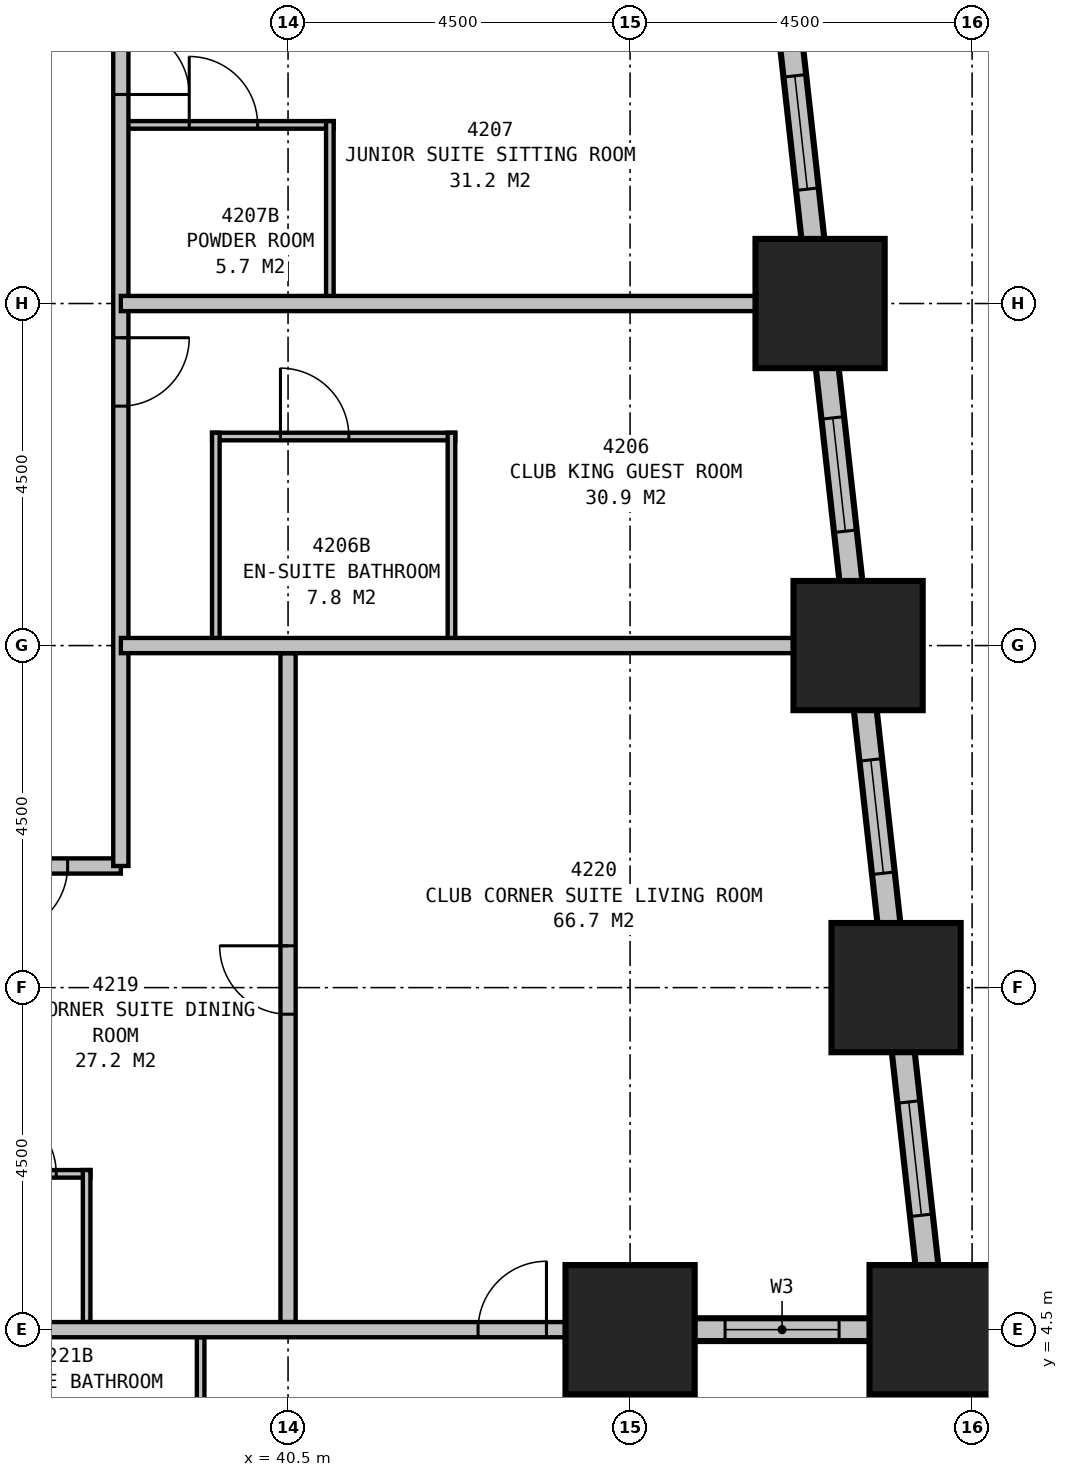
"""IFC4 building model, lengths in metres.
Left out: names, types, materials, properties, quantities, classifications, styles, units other than length and angle.
Written with IfcOpenShell. Run it as: python <this file> out.ifc"""

import sys

from ifc_helpers import new_model, si_unit, direction, frame, frame_2d, origin, origin_2d, place, context, subcontext, project, spatial, rectangle, extrude, element, fill, save


model = new_model("IFC4")
c1 = context("Model", 3, precision=1e-05, world=origin(), true_north=direction((0.0, 1.0)))
c2 = subcontext(c1, "Body", "Model", "MODEL_VIEW")
j1 = project(units=[si_unit("LENGTHUNIT", "METRE"), si_unit("PLANEANGLEUNIT", "RADIAN")], contexts=[c1])
p1 = place(None, origin())
s1 = spatial("IfcSite", under=j1, at=p1, CompositionType="ELEMENT")
p2 = place(p1, origin())
s2 = spatial("IfcBuilding", under=s1, at=p2, CompositionType="ELEMENT")
p3 = place(p2, frame((0.0, 0.0, 165.9)))
s3 = spatial("IfcBuildingStorey", under=s2, at=p3, CompositionType="ELEMENT", Elevation=165.9)
for number, where, z_axis, x_axis in (
    (1, (45.0, 4.5, 0.0), (0.0, 0.0, 1.0), (1.0, 0.0, 0.0)),
    (2, (49.0, 4.5, 0.0), (0.0, 0.0, 1.0), (1.0, 0.0, 0.0)),
    (3, (48.5, 9.0, 0.0), (0.0, 0.0, 1.0), (1.0, 0.0, 0.0)),
    (4, (48.0, 13.5, 0.0), (0.0, 0.0, 1.0), (1.0, 0.0, 0.0)),
    (5, (47.5, 18.0, 0.0), (0.0, 0.0, 1.0), (1.0, 0.0, 0.0)),
):
    element("IfcColumn", number, at=place(p3, frame(where, z_axis=z_axis, x_axis=x_axis)), inside=s3, PredefinedType="COLUMN", context=c2, shape_type="SweptSolid", body=[
        extrude(rectangle(XDim=1.7, YDim=1.7, at=origin_2d()), origin(), (0.0, 0.0, 1.0), 3.5),
    ])
p4 = place(p3, frame((45.0, -0.15, 0.0), z_axis=(0.0, 0.0, 1.0), x_axis=(0.0, 1.0, 0.0)))
e6 = element("IfcWall", 6, at=p4, inside=s3, PredefinedType="STANDARD", context=c2, shape_type="SweptSolid", body=[
    extrude(rectangle(XDim=4.8, YDim=0.3, at=frame_2d((2.4, 0.0))), origin(), (0.0, 0.0, 1.0), 2.25),
])
p5 = place(p4, frame((1.2, 0.0, 0.5)))
e7 = element("IfcOpeningElement", 7, at=p5, cuts=e6, PredefinedType="OPENING", context=c2, shape_type="SweptSolid", body=[
    extrude(rectangle(XDim=2.4, YDim=1.6, at=frame_2d((1.2, 0.8))), frame((0.0, 0.16, 0.0), z_axis=(0.0, -1.0, 0.0), x_axis=(1.0, 0.0, 0.0)), (0.0, 0.0, 1.0), 0.32),
])
p6 = place(p3, frame((44.85, 4.5, 0.0), z_axis=(0.0, 0.0, 1.0), x_axis=(1.0, 0.0, 0.0)))
e8 = element("IfcWall", 8, at=p6, inside=s3, PredefinedType="STANDARD", context=c2, shape_type="SweptSolid", body=[
    extrude(rectangle(XDim=4.3, YDim=0.3, at=frame_2d((2.15, 0.0))), origin(), (0.0, 0.0, 1.0), 2.25),
])
p7 = place(p6, frame((1.4, 0.0, 0.5)))
e9 = element("IfcOpeningElement", 9, at=p7, cuts=e8, PredefinedType="OPENING", context=c2, shape_type="SweptSolid", body=[
    extrude(rectangle(XDim=1.5, YDim=1.6, at=frame_2d((0.75, 0.8))), frame((0.0, 0.16, 0.0), z_axis=(0.0, -1.0, 0.0), x_axis=(1.0, 0.0, 0.0)), (0.0, 0.0, 1.0), 0.32),
])
p8 = place(p3, frame((49.017, 4.351, 0.0), z_axis=(0.0, 0.0, 1.0), x_axis=(-0.110433201132, 0.993883548555, 0.0)))
e10 = element("IfcWall", 10, at=p8, inside=s3, PredefinedType="STANDARD", context=c2, shape_type="SweptSolid", body=[
    extrude(rectangle(XDim=31.994, YDim=0.3, at=frame_2d((15.997, 0.0))), origin(), (0.0, 0.0, 1.0), 2.25),
])
p9 = place(p8, frame((1.664, 0.0, 0.5)))
e11 = element("IfcOpeningElement", 11, at=p9, cuts=e10, PredefinedType="OPENING", context=c2, shape_type="SweptSolid", body=[
    extrude(rectangle(XDim=1.5, YDim=1.6, at=frame_2d((0.75, 0.8))), frame((0.0, 0.16, 0.0), z_axis=(0.0, -1.0, 0.0), x_axis=(1.0, 0.0, 0.0)), (0.0, 0.0, 1.0), 0.32),
])
p10 = place(p8, frame((6.192, 0.0, 0.5)))
e12 = element("IfcOpeningElement", 12, at=p10, cuts=e10, PredefinedType="OPENING", context=c2, shape_type="SweptSolid", body=[
    extrude(rectangle(XDim=1.5, YDim=1.6, at=frame_2d((0.75, 0.8))), frame((0.0, 0.16, 0.0), z_axis=(0.0, -1.0, 0.0), x_axis=(1.0, 0.0, 0.0)), (0.0, 0.0, 1.0), 0.32),
])
p11 = place(p8, frame((10.719, 0.0, 0.5)))
e13 = element("IfcOpeningElement", 13, at=p11, cuts=e10, PredefinedType="OPENING", context=c2, shape_type="SweptSolid", body=[
    extrude(rectangle(XDim=1.5, YDim=1.6, at=frame_2d((0.75, 0.8))), frame((0.0, 0.16, 0.0), z_axis=(0.0, -1.0, 0.0), x_axis=(1.0, 0.0, 0.0)), (0.0, 0.0, 1.0), 0.32),
])
p12 = place(p8, frame((15.247, 0.0, 0.5)))
e14 = element("IfcOpeningElement", 14, at=p12, cuts=e10, PredefinedType="OPENING", context=c2, shape_type="SweptSolid", body=[
    extrude(rectangle(XDim=1.5, YDim=1.6, at=frame_2d((0.75, 0.8))), frame((0.0, 0.16, 0.0), z_axis=(0.0, -1.0, 0.0), x_axis=(1.0, 0.0, 0.0)), (0.0, 0.0, 1.0), 0.32),
])
p13 = place(p8, frame((19.775, 0.0, 0.5)))
e15 = element("IfcOpeningElement", 15, at=p13, cuts=e10, PredefinedType="OPENING", context=c2, shape_type="SweptSolid", body=[
    extrude(rectangle(XDim=1.5, YDim=1.6, at=frame_2d((0.75, 0.8))), frame((0.0, 0.16, 0.0), z_axis=(0.0, -1.0, 0.0), x_axis=(1.0, 0.0, 0.0)), (0.0, 0.0, 1.0), 0.32),
])
p14 = place(p8, frame((24.302, 0.0, 0.5)))
e16 = element("IfcOpeningElement", 16, at=p14, cuts=e10, PredefinedType="OPENING", context=c2, shape_type="SweptSolid", body=[
    extrude(rectangle(XDim=1.5, YDim=1.6, at=frame_2d((0.75, 0.8))), frame((0.0, 0.16, 0.0), z_axis=(0.0, -1.0, 0.0), x_axis=(1.0, 0.0, 0.0)), (0.0, 0.0, 1.0), 0.32),
])
p15 = place(p8, frame((28.83, 0.0, 0.5)))
e17 = element("IfcOpeningElement", 17, at=p15, cuts=e10, PredefinedType="OPENING", context=c2, shape_type="SweptSolid", body=[
    extrude(rectangle(XDim=1.5, YDim=1.6, at=frame_2d((0.75, 0.8))), frame((0.0, 0.16, 0.0), z_axis=(0.0, -1.0, 0.0), x_axis=(1.0, 0.0, 0.0)), (0.0, 0.0, 1.0), 0.32),
])
p16 = place(p3, frame((11.2, 10.6, 0.0), z_axis=(0.0, 0.0, 1.0), x_axis=(1.0, 0.0, 0.0)))
e18 = element("IfcWall", 18, at=p16, inside=s3, PredefinedType="PARTITIONING", context=c2, shape_type="SweptSolid", body=[
    extrude(rectangle(XDim=27.1, YDim=0.2, at=frame_2d((13.55, 0.0))), origin(), (0.0, 0.0, 1.0), 3.25),
])
p17 = place(p16, frame((4.05, 0.0, 0.0), z_axis=(0.0, 0.0, 1.0), x_axis=(-1.0, 0.0, 0.0)))
e19 = element("IfcOpeningElement", 19, at=p17, cuts=e18, PredefinedType="OPENING", context=c2, shape_type="SweptSolid", body=[
    extrude(rectangle(XDim=0.9, YDim=2.1, at=frame_2d((0.45, 1.05))), frame((0.0, 0.11, 0.0), z_axis=(0.0, -1.0, 0.0), x_axis=(1.0, 0.0, 0.0)), (0.0, 0.0, 1.0), 0.22),
])
p18 = place(p16, frame((12.65, 0.0, 0.0), z_axis=(0.0, 0.0, 1.0), x_axis=(-1.0, 0.0, 0.0)))
e20 = element("IfcOpeningElement", 20, at=p18, cuts=e18, PredefinedType="OPENING", context=c2, shape_type="SweptSolid", body=[
    extrude(rectangle(XDim=1.0, YDim=2.1, at=frame_2d((0.5, 1.05))), frame((0.0, 0.11, 0.0), z_axis=(0.0, -1.0, 0.0), x_axis=(1.0, 0.0, 0.0)), (0.0, 0.0, 1.0), 0.22),
])
p19 = place(p16, frame((17.55, 0.0, 0.0), z_axis=(0.0, 0.0, 1.0), x_axis=(-1.0, 0.0, 0.0)))
e21 = element("IfcOpeningElement", 21, at=p19, cuts=e18, PredefinedType="OPENING", context=c2, shape_type="SweptSolid", body=[
    extrude(rectangle(XDim=0.9, YDim=2.1, at=frame_2d((0.45, 1.05))), frame((0.0, 0.11, 0.0), z_axis=(0.0, -1.0, 0.0), x_axis=(1.0, 0.0, 0.0)), (0.0, 0.0, 1.0), 0.22),
])
p20 = place(p16, frame((1.6, 0.0, 0.0), z_axis=(0.0, 0.0, 1.0), x_axis=(-1.0, 0.0, 0.0)))
e22 = element("IfcOpeningElement", 22, at=p20, cuts=e18, PredefinedType="OPENING", context=c2, shape_type="SweptSolid", body=[
    extrude(rectangle(XDim=0.9, YDim=2.1, at=frame_2d((0.45, 1.05))), frame((0.0, 0.11, 0.0), z_axis=(0.0, -1.0, 0.0), x_axis=(1.0, 0.0, 0.0)), (0.0, 0.0, 1.0), 0.22),
])
p21 = place(p16, frame((26.4, 0.0, 0.0), z_axis=(0.0, 0.0, 1.0), x_axis=(-1.0, 0.0, 0.0)))
e23 = element("IfcOpeningElement", 23, at=p21, cuts=e18, PredefinedType="OPENING", context=c2, shape_type="SweptSolid", body=[
    extrude(rectangle(XDim=0.9, YDim=2.1, at=frame_2d((0.45, 1.05))), frame((0.0, 0.11, 0.0), z_axis=(0.0, -1.0, 0.0), x_axis=(1.0, 0.0, 0.0)), (0.0, 0.0, 1.0), 0.22),
])
p22 = place(p3, frame((38.3, 10.6, 0.0), z_axis=(0.0, 0.0, 1.0), x_axis=(0.0, 1.0, 0.0)))
e24 = element("IfcWall", 24, at=p22, inside=s3, PredefinedType="PARTITIONING", context=c2, shape_type="SweptSolid", body=[
    extrude(rectangle(XDim=18.7, YDim=0.2, at=frame_2d((9.35, 0.0))), origin(), (0.0, 0.0, 1.0), 3.25),
])
p23 = place(p22, frame((6.95, 0.0, 0.0), z_axis=(0.0, 0.0, 1.0), x_axis=(-1.0, 0.0, 0.0)))
e25 = element("IfcOpeningElement", 25, at=p23, cuts=e24, PredefinedType="OPENING", context=c2, shape_type="SweptSolid", body=[
    extrude(rectangle(XDim=0.9, YDim=2.1, at=frame_2d((0.45, 1.05))), frame((0.0, 0.11, 0.0), z_axis=(0.0, -1.0, 0.0), x_axis=(1.0, 0.0, 0.0)), (0.0, 0.0, 1.0), 0.22),
])
p24 = place(p22, frame((11.05, 0.0, 0.0), z_axis=(0.0, 0.0, 1.0), x_axis=(-1.0, 0.0, 0.0)))
e26 = element("IfcOpeningElement", 26, at=p24, cuts=e24, PredefinedType="OPENING", context=c2, shape_type="SweptSolid", body=[
    extrude(rectangle(XDim=0.9, YDim=2.1, at=frame_2d((0.45, 1.05))), frame((0.0, 0.11, 0.0), z_axis=(0.0, -1.0, 0.0), x_axis=(1.0, 0.0, 0.0)), (0.0, 0.0, 1.0), 0.22),
])
p25 = place(p3, frame((38.3, 18.0, 0.0), z_axis=(0.0, 0.0, 1.0), x_axis=(1.0, 0.0, 0.0)))
e27 = element("IfcWall", 27, at=p25, inside=s3, PredefinedType="PARTITIONING", context=c2, shape_type="SweptSolid", body=[
    extrude(rectangle(XDim=9.199, YDim=0.2, at=frame_2d((4.6, 0.0))), origin(), (0.0, 0.0, 1.0), 2.25),
])
for number, where, z_axis, x_axis in (
    (28, (39.55, 13.5, 0.0), (0.0, 0.0, 1.0), (0.0, 1.0, 0.0)),
    (29, (42.65, 13.5, 0.0), (0.0, 0.0, 1.0), (0.0, 1.0, 0.0)),
):
    element("IfcWall", number, at=place(p3, frame(where, z_axis=z_axis, x_axis=x_axis)), inside=s3, PredefinedType="PLUMBINGWALL", context=c2, shape_type="SweptSolid", body=[
        extrude(rectangle(XDim=2.8, YDim=0.1, at=frame_2d((1.4, 0.0))), origin(), (0.0, 0.0, 1.0), 3.25),
    ])
p26 = place(p3, frame((39.5, 16.25, 0.0), z_axis=(0.0, 0.0, 1.0), x_axis=(1.0, 0.0, 0.0)))
e30 = element("IfcWall", 30, at=p26, inside=s3, PredefinedType="PLUMBINGWALL", context=c2, shape_type="SweptSolid", body=[
    extrude(rectangle(XDim=3.2, YDim=0.1, at=frame_2d((1.6, 0.0))), origin(), (0.0, 0.0, 1.0), 3.25),
])
p27 = place(p26, frame((0.9, 0.0, 0.0)))
e31 = element("IfcOpeningElement", 31, at=p27, cuts=e30, PredefinedType="OPENING", context=c2, shape_type="SweptSolid", body=[
    extrude(rectangle(XDim=0.9, YDim=2.1, at=frame_2d((0.45, 1.05))), frame((0.0, 0.06, 0.0), z_axis=(0.0, -1.0, 0.0), x_axis=(1.0, 0.0, 0.0)), (0.0, 0.0, 1.0), 0.12),
])
p28 = place(p3, frame((41.05, 18.0, 0.0), z_axis=(0.0, 0.0, 1.0), x_axis=(0.0, 1.0, 0.0)))
e32 = element("IfcWall", 32, at=p28, inside=s3, PredefinedType="PLUMBINGWALL", context=c2, shape_type="SweptSolid", body=[
    extrude(rectangle(XDim=2.4, YDim=0.1, at=frame_2d((1.2, 0.0))), origin(), (0.0, 0.0, 1.0), 3.25),
])
p29 = place(p3, frame((38.3, 20.35, 0.0), z_axis=(0.0, 0.0, 1.0), x_axis=(1.0, 0.0, 0.0)))
e33 = element("IfcWall", 33, at=p29, inside=s3, PredefinedType="PLUMBINGWALL", context=c2, shape_type="SweptSolid", body=[
    extrude(rectangle(XDim=2.8, YDim=0.1, at=frame_2d((1.4, 0.0))), origin(), (0.0, 0.0, 1.0), 3.25),
])
p30 = place(p29, frame((0.9, 0.0, 0.0)))
e34 = element("IfcOpeningElement", 34, at=p30, cuts=e33, PredefinedType="OPENING", context=c2, shape_type="SweptSolid", body=[
    extrude(rectangle(XDim=0.9, YDim=2.1, at=frame_2d((0.45, 1.05))), frame((0.0, 0.06, 0.0), z_axis=(0.0, -1.0, 0.0), x_axis=(1.0, 0.0, 0.0)), (0.0, 0.0, 1.0), 0.12),
])
p31 = place(p3, frame((38.3, 13.5, 0.0), z_axis=(0.0, 0.0, 1.0), x_axis=(1.0, 0.0, 0.0)))
e35 = element("IfcWall", 35, at=p31, inside=s3, PredefinedType="PARTITIONING", context=c2, shape_type="SweptSolid", body=[
    extrude(rectangle(XDim=9.921, YDim=0.2, at=frame_2d((4.96, 0.0))), origin(), (0.0, 0.0, 1.0), 1.95),
])
p32 = place(p3, frame((35.9, 4.5, 0.0), z_axis=(0.0, 0.0, 1.0), x_axis=(1.0, 0.0, 0.0)))
e36 = element("IfcWall", 36, at=p32, inside=s3, PredefinedType="PARTITIONING", context=c2, shape_type="SweptSolid", body=[
    extrude(rectangle(XDim=9.1, YDim=0.2, at=frame_2d((4.55, 0.0))), origin(), (0.0, 0.0, 1.0), 3.25),
])
p33 = place(p32, frame((7.1, 0.0, 0.0)))
e37 = element("IfcOpeningElement", 37, at=p33, cuts=e36, PredefinedType="OPENING", context=c2, shape_type="SweptSolid", body=[
    extrude(rectangle(XDim=0.9, YDim=2.1, at=frame_2d((0.45, 1.05))), frame((0.0, 0.11, 0.0), z_axis=(0.0, -1.0, 0.0), x_axis=(1.0, 0.0, 0.0)), (0.0, 0.0, 1.0), 0.22),
])
p34 = place(p3, frame((40.5, 4.6, 0.0), z_axis=(0.0, 0.0, 1.0), x_axis=(0.0, 1.0, 0.0)))
e38 = element("IfcWall", 38, at=p34, inside=s3, PredefinedType="PARTITIONING", context=c2, shape_type="SweptSolid", body=[
    extrude(rectangle(XDim=8.8, YDim=0.2, at=frame_2d((4.4, 0.0))), origin(), (0.0, 0.0, 1.0), 2.25),
])
p35 = place(p34, frame((4.05, 0.0, 0.0)))
e39 = element("IfcOpeningElement", 39, at=p35, cuts=e38, PredefinedType="OPENING", context=c2, shape_type="SweptSolid", body=[
    extrude(rectangle(XDim=0.9, YDim=2.1, at=frame_2d((0.45, 1.05))), frame((0.0, 0.11, 0.0), z_axis=(0.0, -1.0, 0.0), x_axis=(1.0, 0.0, 0.0)), (0.0, 0.0, 1.0), 0.22),
])
p36 = place(p3, frame((37.85, 4.6, 0.0), z_axis=(0.0, 0.0, 1.0), x_axis=(0.0, 1.0, 0.0)))
e40 = element("IfcWall", 40, at=p36, inside=s3, PredefinedType="PLUMBINGWALL", context=c2, shape_type="SweptSolid", body=[
    extrude(rectangle(XDim=2.0, YDim=0.1, at=frame_2d((1.0, 0.0))), origin(), (0.0, 0.0, 1.0), 3.25),
])
p37 = place(p3, frame((36.1, 6.55, 0.0), z_axis=(0.0, 0.0, 1.0), x_axis=(1.0, 0.0, 0.0)))
e41 = element("IfcWall", 41, at=p37, inside=s3, PredefinedType="PLUMBINGWALL", context=c2, shape_type="SweptSolid", body=[
    extrude(rectangle(XDim=1.8, YDim=0.1, at=frame_2d((0.9, 0.0))), origin(), (0.0, 0.0, 1.0), 3.25),
])
p38 = place(p37, frame((0.45, 0.0, 0.0)))
e42 = element("IfcOpeningElement", 42, at=p38, cuts=e41, PredefinedType="OPENING", context=c2, shape_type="SweptSolid", body=[
    extrude(rectangle(XDim=0.9, YDim=2.1, at=frame_2d((0.45, 1.05))), frame((0.0, 0.06, 0.0), z_axis=(0.0, -1.0, 0.0), x_axis=(1.0, 0.0, 0.0)), (0.0, 0.0, 1.0), 0.12),
])
p39 = place(p3, frame((39.35, 4.4, 0.0), z_axis=(0.0, 0.0, 1.0), x_axis=(0.0, -1.0, 0.0)))
e43 = element("IfcWall", 43, at=p39, inside=s3, PredefinedType="PLUMBINGWALL", context=c2, shape_type="SweptSolid", body=[
    extrude(rectangle(XDim=2.3, YDim=0.1, at=frame_2d((1.15, 0.0))), origin(), (0.0, 0.0, 1.0), 3.25),
])
p40 = place(p7, origin())
e44 = element("IfcWindow", 44, at=p40, inside=s3, PartitioningType="SINGLE_PANEL", PredefinedType="WINDOW", context=c2, shape_type="SweptSolid", body=[
    extrude(rectangle(XDim=1.5, YDim=1.6, at=frame_2d((0.75, 0.8))), frame((0.0, 0.03, 0.0), z_axis=(0.0, -1.0, 0.0), x_axis=(1.0, 0.0, 0.0)), (0.0, 0.0, 1.0), 0.06),
])
fill(e9, e44)
p41 = place(p9, origin())
e45 = element("IfcWindow", 45, at=p41, inside=s3, PartitioningType="SINGLE_PANEL", PredefinedType="WINDOW", context=c2, shape_type="SweptSolid", body=[
    extrude(rectangle(XDim=1.5, YDim=1.6, at=frame_2d((0.75, 0.8))), frame((0.0, 0.03, 0.0), z_axis=(0.0, -1.0, 0.0), x_axis=(1.0, 0.0, 0.0)), (0.0, 0.0, 1.0), 0.06),
])
fill(e11, e45)
p42 = place(p10, origin())
e46 = element("IfcWindow", 46, at=p42, inside=s3, PartitioningType="SINGLE_PANEL", PredefinedType="WINDOW", context=c2, shape_type="SweptSolid", body=[
    extrude(rectangle(XDim=1.5, YDim=1.6, at=frame_2d((0.75, 0.8))), frame((0.0, 0.03, 0.0), z_axis=(0.0, -1.0, 0.0), x_axis=(1.0, 0.0, 0.0)), (0.0, 0.0, 1.0), 0.06),
])
fill(e12, e46)
p43 = place(p11, origin())
e47 = element("IfcWindow", 47, at=p43, inside=s3, PartitioningType="SINGLE_PANEL", PredefinedType="WINDOW", context=c2, shape_type="SweptSolid", body=[
    extrude(rectangle(XDim=1.5, YDim=1.6, at=frame_2d((0.75, 0.8))), frame((0.0, 0.03, 0.0), z_axis=(0.0, -1.0, 0.0), x_axis=(1.0, 0.0, 0.0)), (0.0, 0.0, 1.0), 0.06),
])
fill(e13, e47)
p44 = place(p12, origin())
e48 = element("IfcWindow", 48, at=p44, inside=s3, PartitioningType="SINGLE_PANEL", PredefinedType="WINDOW", context=c2, shape_type="SweptSolid", body=[
    extrude(rectangle(XDim=1.5, YDim=1.6, at=frame_2d((0.75, 0.8))), frame((0.0, 0.03, 0.0), z_axis=(0.0, -1.0, 0.0), x_axis=(1.0, 0.0, 0.0)), (0.0, 0.0, 1.0), 0.06),
])
fill(e14, e48)
p45 = place(p21, origin())
e49 = element("IfcDoor", 49, at=p45, inside=s3, OperationType="SINGLE_SWING_RIGHT", PredefinedType="DOOR", context=c2, shape_type="SweptSolid", body=[
    extrude(rectangle(XDim=0.9, YDim=2.1, at=frame_2d((0.45, 1.05))), frame((0.0, 0.025, 0.0), z_axis=(0.0, -1.0, 0.0), x_axis=(1.0, 0.0, 0.0)), (0.0, 0.0, 1.0), 0.05),
])
fill(e23, e49)
p46 = place(p23, origin())
e50 = element("IfcDoor", 50, at=p46, inside=s3, OperationType="SINGLE_SWING_LEFT", PredefinedType="DOOR", context=c2, shape_type="SweptSolid", body=[
    extrude(rectangle(XDim=0.9, YDim=2.1, at=frame_2d((0.45, 1.05))), frame((0.0, 0.025, 0.0), z_axis=(0.0, -1.0, 0.0), x_axis=(1.0, 0.0, 0.0)), (0.0, 0.0, 1.0), 0.05),
])
fill(e25, e50)
p47 = place(p24, origin())
e51 = element("IfcDoor", 51, at=p47, inside=s3, OperationType="SINGLE_SWING_RIGHT", PredefinedType="DOOR", context=c2, shape_type="SweptSolid", body=[
    extrude(rectangle(XDim=0.9, YDim=2.1, at=frame_2d((0.45, 1.05))), frame((0.0, 0.025, 0.0), z_axis=(0.0, -1.0, 0.0), x_axis=(1.0, 0.0, 0.0)), (0.0, 0.0, 1.0), 0.05),
])
fill(e26, e51)
p48 = place(p27, origin())
e52 = element("IfcDoor", 52, at=p48, inside=s3, OperationType="SINGLE_SWING_LEFT", PredefinedType="DOOR", context=c2, shape_type="SweptSolid", body=[
    extrude(rectangle(XDim=0.9, YDim=2.1, at=frame_2d((0.45, 1.05))), frame((0.0, 0.025, 0.0), z_axis=(0.0, -1.0, 0.0), x_axis=(1.0, 0.0, 0.0)), (0.0, 0.0, 1.0), 0.05),
])
fill(e31, e52)
p49 = place(p30, origin())
e53 = element("IfcDoor", 53, at=p49, inside=s3, OperationType="SINGLE_SWING_LEFT", PredefinedType="DOOR", context=c2, shape_type="SweptSolid", body=[
    extrude(rectangle(XDim=0.9, YDim=2.1, at=frame_2d((0.45, 1.05))), frame((0.0, 0.025, 0.0), z_axis=(0.0, -1.0, 0.0), x_axis=(1.0, 0.0, 0.0)), (0.0, 0.0, 1.0), 0.05),
])
fill(e34, e53)
p50 = place(p33, origin())
e54 = element("IfcDoor", 54, at=p50, inside=s3, OperationType="SINGLE_SWING_RIGHT", PredefinedType="DOOR", context=c2, shape_type="SweptSolid", body=[
    extrude(rectangle(XDim=0.9, YDim=2.1, at=frame_2d((0.45, 1.05))), frame((0.0, 0.025, 0.0), z_axis=(0.0, -1.0, 0.0), x_axis=(1.0, 0.0, 0.0)), (0.0, 0.0, 1.0), 0.05),
])
fill(e37, e54)
p51 = place(p35, origin())
e55 = element("IfcDoor", 55, at=p51, inside=s3, OperationType="SINGLE_SWING_RIGHT", PredefinedType="DOOR", context=c2, shape_type="SweptSolid", body=[
    extrude(rectangle(XDim=0.9, YDim=2.1, at=frame_2d((0.45, 1.05))), frame((0.0, 0.025, 0.0), z_axis=(0.0, -1.0, 0.0), x_axis=(1.0, 0.0, 0.0)), (0.0, 0.0, 1.0), 0.05),
])
fill(e39, e55)
p52 = place(p38, origin())
e56 = element("IfcDoor", 56, at=p52, inside=s3, OperationType="SINGLE_SWING_LEFT", PredefinedType="DOOR", context=c2, shape_type="SweptSolid", body=[
    extrude(rectangle(XDim=0.9, YDim=2.1, at=frame_2d((0.45, 1.05))), frame((0.0, 0.025, 0.0), z_axis=(0.0, -1.0, 0.0), x_axis=(1.0, 0.0, 0.0)), (0.0, 0.0, 1.0), 0.05),
])
fill(e42, e56)
save(model, sys.argv[1])
